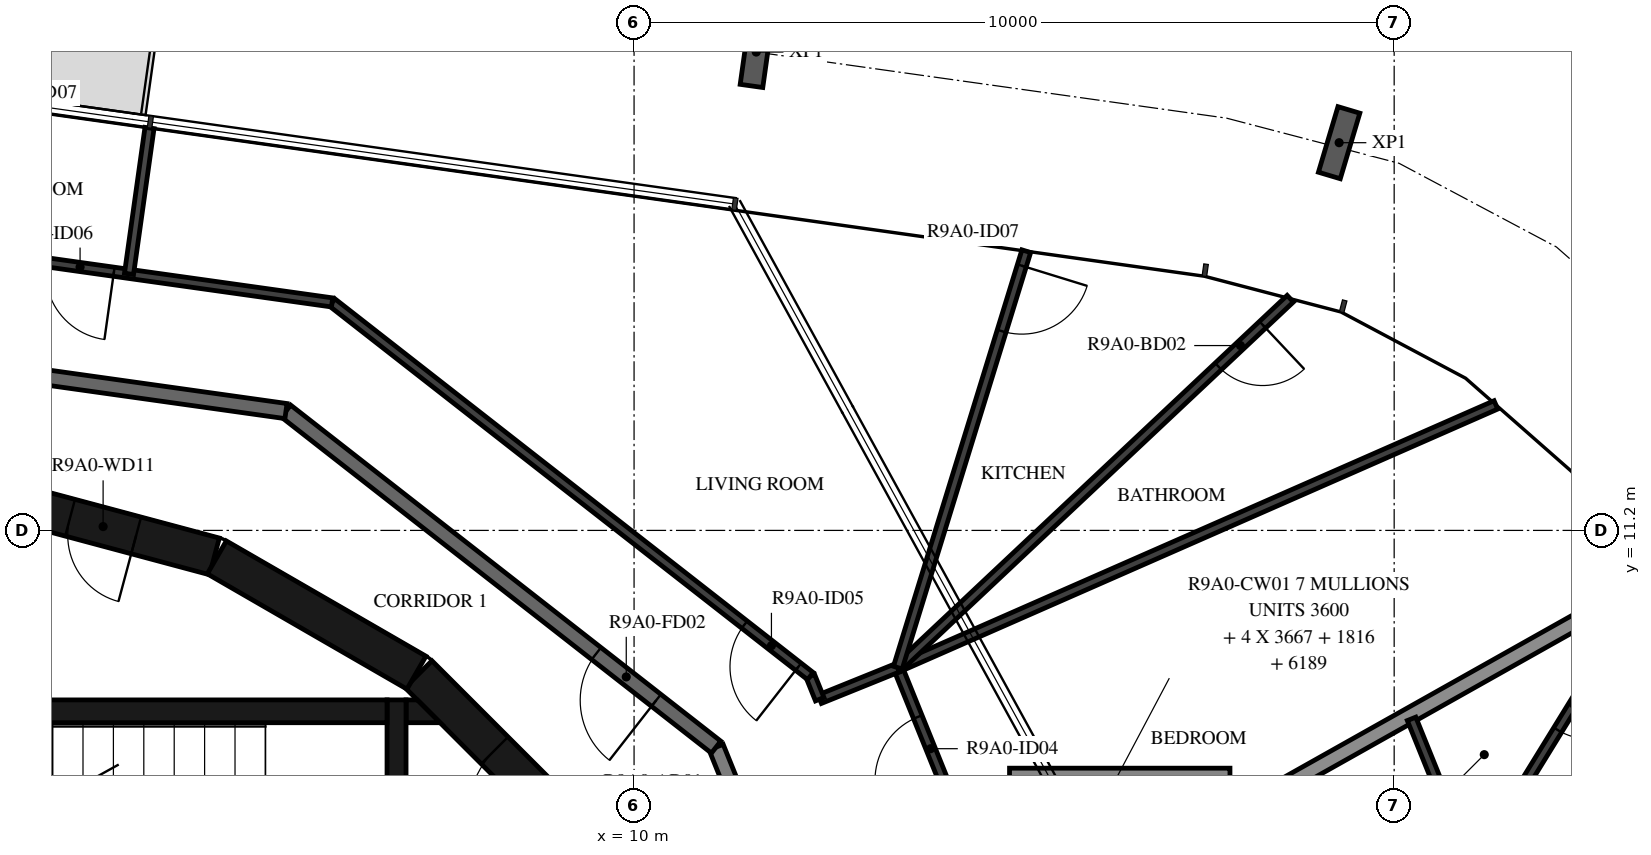
"""IFC4 building model, lengths in metres.
Left out: names, types, materials, properties, quantities, classifications, styles, units other than length and angle.
Written with IfcOpenShell. Run it as: python <this file> out.ifc"""

import sys

from ifc_helpers import new_model, si_unit, direction, frame, frame_2d, origin, origin_2d, place, context, subcontext, project, spatial, polyline, rectangle, i_section, outline, extrude, element, fill, save


model = new_model("IFC4")
c1 = context("Model", 3, precision=1e-05, world=origin(), true_north=direction((0.0, 1.0)))
c2 = subcontext(c1, "Body", "Model", "MODEL_VIEW")
j1 = project(units=[si_unit("LENGTHUNIT", "METRE"), si_unit("PLANEANGLEUNIT", "RADIAN")], contexts=[c1])
p1 = place(None, origin())
s1 = spatial("IfcSite", under=j1, at=p1, CompositionType="ELEMENT")
p2 = place(p1, origin())
s2 = spatial("IfcBuilding", under=s1, at=p2, CompositionType="ELEMENT")
p3 = place(p2, frame((0.0, 0.0, 340.0)))
s3 = spatial("IfcBuildingStorey", under=s2, at=p3, CompositionType="ELEMENT", Elevation=340.0)
for number, where, z_axis, x_axis in (
    (1, (19.276, 16.301, -0.38), (0.0, 0.0, 1.0), (0.958, -0.286, 0.0)),
    (2, (11.607, 17.493, -0.38), (0.0, 0.0, 1.0), (0.99, -0.139, 0.0)),
):
    element("IfcColumn", number, at=place(p3, frame(where, z_axis=z_axis, x_axis=x_axis)), inside=s3, PredefinedType="COLUMN", context=c2, shape_type="SweptSolid", body=[
        extrude(i_section(OverallWidth=0.3, OverallDepth=0.9, WebThickness=0.019, FlangeThickness=0.035, FilletRadius=0.03, at=origin_2d()), origin(), (0.0, 0.0, 1.0), 3.5),
    ])
p4 = place(p3, frame((9.308, 7.164, 0.0), z_axis=(0.0, 0.0, 1.0), x_axis=(-0.707106781187, 0.707106781187, 0.0)))
e3 = element("IfcWall", 3, at=p4, inside=s3, PredefinedType="SHEAR", context=c2, shape_type="SweptSolid", body=[
    extrude(rectangle(XDim=3.032, YDim=0.5, at=frame_2d((1.516, 0.0))), origin(), (0.0, 0.0, 1.0), 3.12),
])
p5 = place(p4, frame((0.416, 0.0, 0.0)))
e4 = element("IfcOpeningElement", 4, at=p5, cuts=e3, PredefinedType="OPENING", context=c2, shape_type="SweptSolid", body=[
    extrude(rectangle(XDim=1.2, YDim=2.1, at=frame_2d((0.6, 1.05))), frame((0.0, 0.26, 0.0), z_axis=(0.0, -1.0, 0.0), x_axis=(1.0, 0.0, 0.0)), (0.0, 0.0, 1.0), 0.52),
])
p6 = place(p3, frame((7.137, 9.329, 0.0), z_axis=(0.0, 0.0, 1.0), x_axis=(-0.865975092491, 0.500087131594, 0.0)))
e5 = element("IfcWall", 5, at=p6, inside=s3, PredefinedType="SHEAR", context=c2, shape_type="SweptSolid", body=[
    extrude(rectangle(XDim=3.033, YDim=0.5, at=frame_2d((1.516, 0.0))), origin(), (0.0, 0.0, 1.0), 3.12),
])
p7 = place(p3, frame((4.479, 10.858, 0.0), z_axis=(0.0, 0.0, 1.0), x_axis=(-0.965948410781, 0.258734743916, 0.0)))
e6 = element("IfcWall", 6, at=p7, inside=s3, PredefinedType="SHEAR", context=c2, shape_type="SweptSolid", body=[
    extrude(rectangle(XDim=3.033, YDim=0.5, at=frame_2d((1.516, 0.0))), origin(), (0.0, 0.0, 1.0), 3.12),
])
p8 = place(p7, frame((1.066, 0.0, 0.0)))
e7 = element("IfcOpeningElement", 7, at=p8, cuts=e6, PredefinedType="OPENING", context=c2, shape_type="SweptSolid", body=[
    extrude(rectangle(XDim=0.9, YDim=2.1, at=frame_2d((0.45, 1.05))), frame((0.0, 0.26, 0.0), z_axis=(0.0, -1.0, 0.0), x_axis=(1.0, 0.0, 0.0)), (0.0, 0.0, 1.0), 0.52),
])
p9 = place(p3, frame((0.0, 8.82, 0.0), z_axis=(0.0, 0.0, 1.0), x_axis=(1.0, 0.0, 0.0)))
e8 = element("IfcWall", 8, at=p9, inside=s3, PredefinedType="SHEAR", context=c2, shape_type="SweptSolid", body=[
    extrude(rectangle(XDim=6.75, YDim=0.3, at=frame_2d((3.375, 0.0))), origin(), (0.0, 0.0, 1.0), 3.12),
])
p10 = place(p3, frame((6.875, 5.05, 0.0), z_axis=(0.0, 0.0, 1.0), x_axis=(0.0, 1.0, 0.0)))
e9 = element("IfcWall", 9, at=p10, inside=s3, PredefinedType="SHEAR", context=c2, shape_type="SweptSolid", body=[
    extrude(rectangle(XDim=3.92, YDim=0.25, at=frame_2d((1.96, 0.0))), origin(), (0.0, 0.0, 1.0), 3.12),
])
p11 = place(p10, frame((1.11, 0.0, 0.0)))
e10 = element("IfcOpeningElement", 10, at=p11, cuts=e9, PredefinedType="OPENING", context=c2, shape_type="SweptSolid", body=[
    extrude(rectangle(XDim=1.2, YDim=2.1, at=frame_2d((0.6, 1.05))), frame((0.0, 0.135, 0.0), z_axis=(0.0, -1.0, 0.0), x_axis=(1.0, 0.0, 0.0)), (0.0, 0.0, 1.0), 0.27),
])
p12 = place(p3, origin())
e11 = element("IfcWall", 11, at=p12, inside=s3, PredefinedType="SHEAR", context=c2, shape_type="SweptSolid", body=[
    extrude(outline(polyline([(7.448, 8.67), (7.0, 8.67), (7.0, 8.97), (7.148, 8.97), (7.448, 8.67)])), origin(), (0.0, 0.0, 1.0), 3.12),
])
p13 = place(p3, frame((13.769, 1.691, 0.0), z_axis=(0.0, 0.0, 1.0), x_axis=(-0.374618189599, 0.92717916932, 0.0)))
e12 = element("IfcWall", 12, at=p13, inside=s3, PredefinedType="STANDARD", context=c2, shape_type="SweptSolid", body=[
    extrude(rectangle(XDim=7.181, YDim=0.2, at=frame_2d((3.591, 0.0))), origin(), (0.0, 0.0, 1.0), 3.12),
])
p14 = place(p13, frame((2.371, 0.0, 0.0)))
e13 = element("IfcOpeningElement", 13, at=p14, cuts=e12, PredefinedType="OPENING", context=c2, shape_type="SweptSolid", body=[
    extrude(rectangle(XDim=1.0, YDim=2.1, at=frame_2d((0.5, 1.05))), frame((0.0, 0.11, 0.0), z_axis=(0.0, -1.0, 0.0), x_axis=(1.0, 0.0, 0.0)), (0.0, 0.0, 1.0), 0.22),
])
p15 = place(p3, frame((11.079, 8.349, 0.0), z_axis=(0.0, 0.0, 1.0), x_axis=(-0.78800478687, 0.615669112324, 0.0)))
e14 = element("IfcWall", 14, at=p15, inside=s3, PredefinedType="STANDARD", context=c2, shape_type="SweptSolid", body=[
    extrude(rectangle(XDim=7.181, YDim=0.2, at=frame_2d((3.591, 0.0))), origin(), (0.0, 0.0, 1.0), 3.12),
])
p16 = place(p15, frame((1.0, 0.0, 0.0)))
e15 = element("IfcOpeningElement", 15, at=p16, cuts=e14, PredefinedType="OPENING", context=c2, shape_type="SweptSolid", body=[
    extrude(rectangle(XDim=1.0, YDim=2.1, at=frame_2d((0.5, 1.05))), frame((0.0, 0.11, 0.0), z_axis=(0.0, -1.0, 0.0), x_axis=(1.0, 0.0, 0.0)), (0.0, 0.0, 1.0), 0.22),
])
p17 = place(p3, frame((5.42, 12.77, 0.0), z_axis=(0.0, 0.0, 1.0), x_axis=(-0.990270565508, 0.139155334385, 0.0)))
e16 = element("IfcWall", 16, at=p17, inside=s3, PredefinedType="STANDARD", context=c2, shape_type="SweptSolid", body=[
    extrude(rectangle(XDim=7.181, YDim=0.2, at=frame_2d((3.59, 0.0))), origin(), (0.0, 0.0, 1.0), 3.12),
])
p18 = place(p3, frame((23.354, 10.537, 0.0), z_axis=(0.0, 0.0, 1.0), x_axis=(-0.871719790551, -0.490004700754, 0.0)))
e17 = element("IfcWall", 17, at=p18, inside=s3, PredefinedType="STANDARD", context=c2, shape_type="SweptSolid", body=[
    extrude(rectangle(XDim=6.326, YDim=0.2, at=frame_2d((3.163, 0.0))), origin(), (0.0, 0.0, 1.0), 2.73),
])
p19 = place(p3, frame((23.357, 10.532, 0.0), z_axis=(0.0, 0.0, 1.0), x_axis=(-0.524476563806, -0.851424884542, 0.0)))
e18 = element("IfcWall", 18, at=p19, inside=s3, PredefinedType="PARTITIONING", context=c2, shape_type="SweptSolid", body=[
    extrude(rectangle(XDim=5.029, YDim=0.12, at=frame_2d((2.515, 0.0))), origin(), (0.0, 0.0, 1.0), 3.12),
])
p20 = place(p19, frame((1.5, 0.0, 0.0)))
e19 = element("IfcOpeningElement", 19, at=p20, cuts=e18, PredefinedType="OPENING", context=c2, shape_type="SweptSolid", body=[
    extrude(rectangle(XDim=0.8, YDim=2.1, at=frame_2d((0.4, 1.05))), frame((0.0, 0.07, 0.0), z_axis=(0.0, -1.0, 0.0), x_axis=(1.0, 0.0, 0.0)), (0.0, 0.0, 1.0), 0.14),
])
p21 = place(p3, frame((20.609, 7.779, 0.0), z_axis=(0.0, 0.0, 1.0), x_axis=(-0.374371668856, 0.927278735633, 0.0)))
e20 = element("IfcWall", 20, at=p21, inside=s3, PredefinedType="PARTITIONING", context=c2, shape_type="SweptSolid", body=[
    extrude(rectangle(XDim=1.016, YDim=0.12, at=frame_2d((0.508, 0.0))), origin(), (0.0, 0.0, 1.0), 3.12),
])
p22 = place(p3, frame((14.406, 7.076, 0.0), z_axis=(0.0, 0.0, 1.0), x_axis=(-0.374503415005, 0.927225534673, 0.0)))
e21 = element("IfcWall", 21, at=p22, inside=s3, PredefinedType="PARTITIONING", context=c2, shape_type="SweptSolid", body=[
    extrude(rectangle(XDim=2.5, YDim=0.12, at=frame_2d((1.25, 0.0))), origin(), (0.0, 0.0, 1.0), 3.12),
])
p23 = place(p22, frame((0.9, 0.0, 0.0)))
e22 = element("IfcOpeningElement", 22, at=p23, cuts=e21, PredefinedType="OPENING", context=c2, shape_type="SweptSolid", body=[
    extrude(rectangle(XDim=0.9, YDim=2.1, at=frame_2d((0.45, 1.05))), frame((0.0, 0.07, 0.0), z_axis=(0.0, -1.0, 0.0), x_axis=(1.0, 0.0, 0.0)), (0.0, 0.0, 1.0), 0.14),
])
p24 = place(p3, frame((13.47, 9.395, 0.0), z_axis=(0.0, 0.0, 1.0), x_axis=(-0.927180061276, -0.374615982003, 0.0)))
e23 = element("IfcWall", 23, at=p24, inside=s3, PredefinedType="PARTITIONING", context=c2, shape_type="SweptSolid", body=[
    extrude(rectangle(XDim=1.109, YDim=0.12, at=frame_2d((0.554, 0.0))), origin(), (0.0, 0.0, 1.0), 3.12),
])
p25 = place(p3, frame((12.442, 8.979, 0.0), z_axis=(0.0, 0.0, 1.0), x_axis=(-0.374979656603, 0.927033039936, 0.0)))
e24 = element("IfcWall", 24, at=p25, inside=s3, PredefinedType="PARTITIONING", context=c2, shape_type="SweptSolid", body=[
    extrude(rectangle(XDim=0.328, YDim=0.12, at=frame_2d((0.164, 0.0))), origin(), (0.0, 0.0, 1.0), 3.12),
])
p26 = place(p3, frame((12.319, 9.283, 0.0), z_axis=(0.0, 0.0, 1.0), x_axis=(-0.788000268464, 0.61567489546, 0.0)))
e25 = element("IfcWall", 25, at=p26, inside=s3, PredefinedType="PARTITIONING", context=c2, shape_type="SweptSolid", body=[
    extrude(rectangle(XDim=7.985, YDim=0.12, at=frame_2d((3.992, 0.0))), origin(), (0.0, 0.0, 1.0), 3.12),
])
p27 = place(p26, frame((0.2, 0.0, 0.0)))
e26 = element("IfcOpeningElement", 26, at=p27, cuts=e25, PredefinedType="OPENING", context=c2, shape_type="SweptSolid", body=[
    extrude(rectangle(XDim=0.9, YDim=2.1, at=frame_2d((0.45, 1.05))), frame((0.0, 0.07, 0.0), z_axis=(0.0, -1.0, 0.0), x_axis=(1.0, 0.0, 0.0)), (0.0, 0.0, 1.0), 0.14),
])
p28 = place(p3, frame((6.027, 14.199, 0.0), z_axis=(0.0, 0.0, 1.0), x_axis=(-0.990271593532, 0.139148018469, 0.0)))
e27 = element("IfcWall", 27, at=p28, inside=s3, PredefinedType="PARTITIONING", context=c2, shape_type="SweptSolid", body=[
    extrude(rectangle(XDim=7.985, YDim=0.12, at=frame_2d((3.992, 0.0))), origin(), (0.0, 0.0, 1.0), 3.12),
])
p29 = place(p28, frame((2.898, 0.0, 0.0)))
e28 = element("IfcOpeningElement", 28, at=p29, cuts=e27, PredefinedType="OPENING", context=c2, shape_type="SweptSolid", body=[
    extrude(rectangle(XDim=0.9, YDim=2.1, at=frame_2d((0.45, 1.05))), frame((0.0, 0.07, 0.0), z_axis=(0.0, -1.0, 0.0), x_axis=(1.0, 0.0, 0.0)), (0.0, 0.0, 1.0), 0.14),
])
p30 = place(p3, frame((21.338, 12.851, 0.0), z_axis=(0.0, 0.0, 1.0), x_axis=(-0.915538158579, -0.402231127818, 0.0)))
e29 = element("IfcWall", 29, at=p30, inside=s3, PredefinedType="PARTITIONING", context=c2, shape_type="SweptSolid", body=[
    extrude(rectangle(XDim=8.594, YDim=0.12, at=frame_2d((4.297, 0.0))), origin(), (0.0, 0.0, 1.0), 3.12),
])
p31 = place(p3, frame((18.633, 14.248, 0.0), z_axis=(0.0, 0.0, 1.0), x_axis=(-0.728595344908, -0.684944394369, 0.0)))
e30 = element("IfcWall", 30, at=p31, inside=s3, PredefinedType="PARTITIONING", context=c2, shape_type="SweptSolid", body=[
    extrude(rectangle(XDim=7.086, YDim=0.12, at=frame_2d((3.543, 0.0))), origin(), (0.0, 0.0, 1.0), 3.12),
])
p32 = place(p31, frame((0.5, 0.0, 0.0)))
e31 = element("IfcOpeningElement", 31, at=p32, cuts=e30, PredefinedType="OPENING", context=c2, shape_type="SweptSolid", body=[
    extrude(rectangle(XDim=0.8, YDim=2.1, at=frame_2d((0.4, 1.05))), frame((0.0, 0.07, 0.0), z_axis=(0.0, -1.0, 0.0), x_axis=(1.0, 0.0, 0.0)), (0.0, 0.0, 1.0), 0.14),
])
p33 = place(p3, frame((15.16, 14.873, 0.0), z_axis=(0.0, 0.0, 1.0), x_axis=(-0.294750051258, -0.955574386055, 0.0)))
e32 = element("IfcWall", 32, at=p33, inside=s3, PredefinedType="PARTITIONING", context=c2, shape_type="SweptSolid", body=[
    extrude(rectangle(XDim=5.733, YDim=0.12, at=frame_2d((2.867, 0.0))), origin(), (0.0, 0.0, 1.0), 3.12),
])
p34 = place(p33, frame((0.2, 0.0, 0.0)))
e33 = element("IfcOpeningElement", 33, at=p34, cuts=e32, PredefinedType="OPENING", context=c2, shape_type="SweptSolid", body=[
    extrude(rectangle(XDim=0.9, YDim=2.1, at=frame_2d((0.45, 1.05))), frame((0.0, 0.07, 0.0), z_axis=(0.0, -1.0, 0.0), x_axis=(1.0, 0.0, 0.0)), (0.0, 0.0, 1.0), 0.14),
])
p35 = place(p3, frame((3.625, 16.494, 0.0), z_axis=(0.0, 0.0, 1.0), x_axis=(-0.139181494832, -0.990266889023, 0.0)))
e34 = element("IfcWall", 34, at=p35, inside=s3, PredefinedType="PARTITIONING", context=c2, shape_type="SweptSolid", body=[
    extrude(rectangle(XDim=1.938, YDim=0.12, at=frame_2d((0.969, 0.0))), origin(), (0.0, 0.0, 1.0), 2.73),
])
p36 = place(p3, origin())
e35 = element("IfcWall", 35, at=p36, inside=s3, PredefinedType="STANDARD", context=c2, shape_type="SweptSolid", body=[
    extrude(outline(polyline([(17.84, 8.072), (17.84, 5.172), (14.94, 5.172), (14.94, 8.072), (17.84, 8.072)]), holes=[polyline([(15.14, 5.372), (17.64, 5.372), (17.64, 7.872), (15.14, 7.872), (15.14, 5.372)])]), origin(), (0.0, 0.0, 1.0), 3.12),
])
p37 = place(p5, origin())
e36 = element("IfcDoor", 36, at=p37, inside=s3, OperationType="SINGLE_SWING_RIGHT", PredefinedType="DOOR", context=c2, shape_type="SweptSolid", body=[
    extrude(rectangle(XDim=1.2, YDim=2.1, at=frame_2d((0.6, 1.05))), frame((0.0, 0.025, 0.0), z_axis=(0.0, -1.0, 0.0), x_axis=(1.0, 0.0, 0.0)), (0.0, 0.0, 1.0), 0.05),
])
fill(e4, e36)
p38 = place(p8, origin())
e37 = element("IfcDoor", 37, at=p38, inside=s3, OperationType="SINGLE_SWING_LEFT", PredefinedType="DOOR", context=c2, shape_type="SweptSolid", body=[
    extrude(rectangle(XDim=0.9, YDim=2.1, at=frame_2d((0.45, 1.05))), frame((0.0, 0.025, 0.0), z_axis=(0.0, -1.0, 0.0), x_axis=(1.0, 0.0, 0.0)), (0.0, 0.0, 1.0), 0.05),
])
fill(e7, e37)
p39 = place(p20, origin())
e38 = element("IfcDoor", 38, at=p39, inside=s3, OperationType="SINGLE_SWING_RIGHT", PredefinedType="DOOR", context=c2, shape_type="SweptSolid", body=[
    extrude(rectangle(XDim=0.8, YDim=2.1, at=frame_2d((0.4, 1.05))), frame((0.0, 0.025, 0.0), z_axis=(0.0, -1.0, 0.0), x_axis=(1.0, 0.0, 0.0)), (0.0, 0.0, 1.0), 0.05),
])
fill(e19, e38)
p40 = place(p16, origin())
e39 = element("IfcDoor", 39, at=p40, inside=s3, OperationType="SINGLE_SWING_LEFT", PredefinedType="DOOR", context=c2, shape_type="SweptSolid", body=[
    extrude(rectangle(XDim=1.0, YDim=2.1, at=frame_2d((0.5, 1.05))), frame((0.0, 0.025, 0.0), z_axis=(0.0, -1.0, 0.0), x_axis=(1.0, 0.0, 0.0)), (0.0, 0.0, 1.0), 0.05),
])
fill(e15, e39)
p41 = place(p23, origin())
e40 = element("IfcDoor", 40, at=p41, inside=s3, OperationType="SINGLE_SWING_LEFT", PredefinedType="DOOR", context=c2, shape_type="SweptSolid", body=[
    extrude(rectangle(XDim=0.9, YDim=2.1, at=frame_2d((0.45, 1.05))), frame((0.0, 0.025, 0.0), z_axis=(0.0, -1.0, 0.0), x_axis=(1.0, 0.0, 0.0)), (0.0, 0.0, 1.0), 0.05),
])
fill(e22, e40)
p42 = place(p27, origin())
e41 = element("IfcDoor", 41, at=p42, inside=s3, OperationType="SINGLE_SWING_LEFT", PredefinedType="DOOR", context=c2, shape_type="SweptSolid", body=[
    extrude(rectangle(XDim=0.9, YDim=2.1, at=frame_2d((0.45, 1.05))), frame((0.0, 0.025, 0.0), z_axis=(0.0, -1.0, 0.0), x_axis=(1.0, 0.0, 0.0)), (0.0, 0.0, 1.0), 0.05),
])
fill(e26, e41)
p43 = place(p29, origin())
e42 = element("IfcDoor", 42, at=p43, inside=s3, OperationType="SINGLE_SWING_LEFT", PredefinedType="DOOR", context=c2, shape_type="SweptSolid", body=[
    extrude(rectangle(XDim=0.9, YDim=2.1, at=frame_2d((0.45, 1.05))), frame((0.0, 0.025, 0.0), z_axis=(0.0, -1.0, 0.0), x_axis=(1.0, 0.0, 0.0)), (0.0, 0.0, 1.0), 0.05),
])
fill(e28, e42)
p44 = place(p34, origin())
e43 = element("IfcDoor", 43, at=p44, inside=s3, OperationType="SINGLE_SWING_LEFT", PredefinedType="DOOR", context=c2, shape_type="SweptSolid", body=[
    extrude(rectangle(XDim=0.9, YDim=2.1, at=frame_2d((0.45, 1.05))), frame((0.0, 0.025, 0.0), z_axis=(0.0, -1.0, 0.0), x_axis=(1.0, 0.0, 0.0)), (0.0, 0.0, 1.0), 0.05),
])
fill(e33, e43)
p45 = place(p32, origin())
e44 = element("IfcDoor", 44, at=p45, inside=s3, OperationType="SINGLE_SWING_LEFT", PredefinedType="DOOR", context=c2, shape_type="SweptSolid", body=[
    extrude(rectangle(XDim=0.8, YDim=2.1, at=frame_2d((0.4, 1.05))), frame((0.0, 0.025, 0.0), z_axis=(0.0, -1.0, 0.0), x_axis=(1.0, 0.0, 0.0)), (0.0, 0.0, 1.0), 0.05),
])
fill(e31, e44)
save(model, sys.argv[1])
